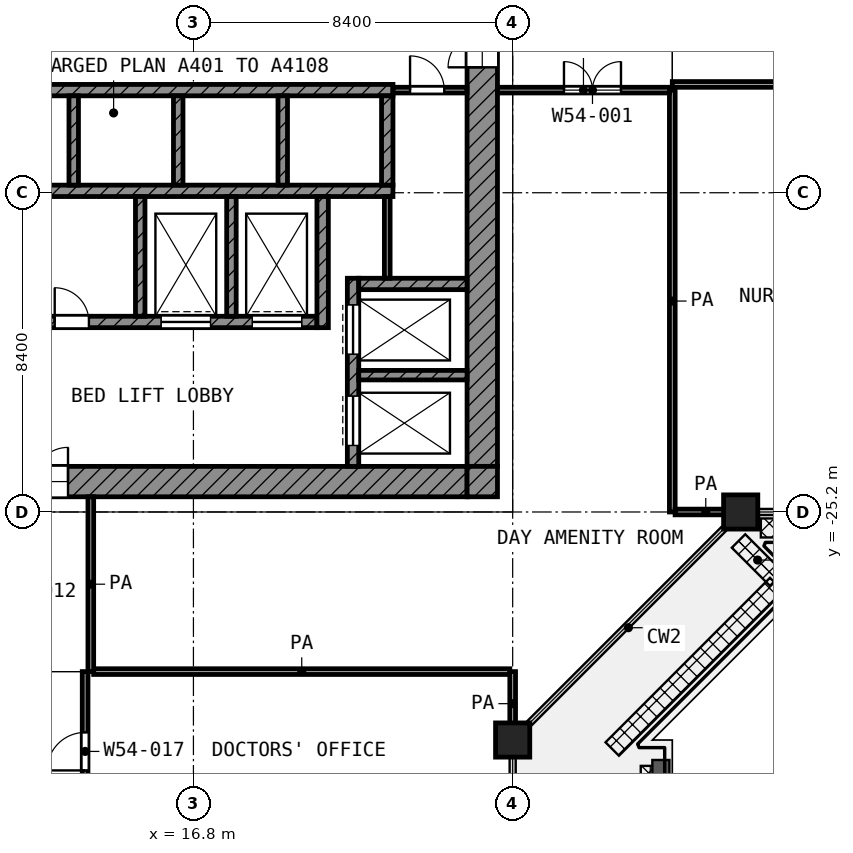
"""IFC4 building model, lengths in metres.
Left out: names, types, materials, properties, quantities, classifications, styles, units other than length and angle.
Written with IfcOpenShell. Run it as: python <this file> out.ifc"""

import sys

from ifc_helpers import new_model, si_unit, direction, frame, frame_2d, origin, origin_2d, place, context, subcontext, project, spatial, rectangle, extrude, element, fill, save


model = new_model("IFC4")
c1 = context("Model", 3, precision=1e-05, world=origin(), true_north=direction((0.0, 1.0)))
c2 = subcontext(c1, "Body", "Model", "MODEL_VIEW")
j1 = project(units=[si_unit("LENGTHUNIT", "METRE"), si_unit("PLANEANGLEUNIT", "RADIAN")], contexts=[c1])
p1 = place(None, origin())
s1 = spatial("IfcSite", under=j1, at=p1, CompositionType="ELEMENT")
p2 = place(p1, origin())
s2 = spatial("IfcBuilding", under=s1, at=p2, CompositionType="ELEMENT")
p3 = place(p2, frame((0.0, 0.0, 255.8)))
s3 = spatial("IfcBuildingStorey", under=s2, at=p3, CompositionType="ELEMENT", Elevation=255.8)
for number, where, z_axis, x_axis in (
    (1, (31.2, -25.2, 0.0), (0.0, 0.0, 1.0), (1.0, 0.0, 0.0)),
    (2, (25.2, -31.2, 0.0), (0.0, 0.0, 1.0), (1.0, 0.0, 0.0)),
):
    element("IfcColumn", number, at=place(p3, frame(where, z_axis=z_axis, x_axis=x_axis)), inside=s3, PredefinedType="COLUMN", context=c2, shape_type="SweptSolid", body=[
        extrude(rectangle(XDim=0.9, YDim=0.9, at=origin_2d()), origin(), (0.0, 0.0, 1.0), 4.2),
    ])
p4 = place(p3, frame((24.4, -24.0, 0.0), z_axis=(0.0, 0.0, 1.0), x_axis=(0.0, 1.0, 0.0)))
e3 = element("IfcWall", 3, at=p4, inside=s3, PredefinedType="SHEAR", context=c2, shape_type="SweptSolid", body=[
    extrude(rectangle(XDim=18.6, YDim=0.8, at=frame_2d((9.3, 0.0))), origin(), (0.0, 0.0, 1.0), 3.6),
])
p5 = place(p4, frame((10.5, 0.0, 0.0)))
e4 = element("IfcOpeningElement", 4, at=p5, cuts=e3, PredefinedType="OPENING", context=c2, shape_type="SweptSolid", body=[
    extrude(rectangle(XDim=1.8, YDim=2.1, at=frame_2d((0.9, 1.05))), frame((0.0, 0.41, 0.0), z_axis=(0.0, -1.0, 0.0), x_axis=(1.0, 0.0, 0.0)), (0.0, 0.0, 1.0), 0.82),
])
p6 = place(p3, frame((5.4, -24.4, 0.0), z_axis=(0.0, 0.0, 1.0), x_axis=(1.0, 0.0, 0.0)))
e5 = element("IfcWall", 5, at=p6, inside=s3, PredefinedType="SHEAR", context=c2, shape_type="SweptSolid", body=[
    extrude(rectangle(XDim=18.6, YDim=0.8, at=frame_2d((9.3, 0.0))), origin(), (0.0, 0.0, 1.0), 3.6),
])
p7 = place(p6, frame((6.3, 0.0, 0.0)))
e6 = element("IfcOpeningElement", 6, at=p7, cuts=e5, PredefinedType="OPENING", context=c2, shape_type="SweptSolid", body=[
    extrude(rectangle(XDim=1.8, YDim=2.1, at=frame_2d((0.9, 1.05))), frame((0.0, 0.41, 0.0), z_axis=(0.0, -1.0, 0.0), x_axis=(1.0, 0.0, 0.0)), (0.0, 0.0, 1.0), 0.82),
])
p8 = place(p3, frame((24.4, -24.8, 0.0), z_axis=(0.0, 0.0, 1.0), x_axis=(0.0, 1.0, 0.0)))
e7 = element("IfcWall", 7, at=p8, inside=s3, PredefinedType="SHEAR", context=c2, shape_type="SweptSolid", body=[
    extrude(rectangle(XDim=0.8, YDim=0.8, at=frame_2d((0.4, 0.0))), origin(), (0.0, 0.0, 1.0), 3.6),
])
p9 = place(p3, frame((5.4, -14.1, 0.0), z_axis=(0.0, 0.0, 1.0), x_axis=(1.0, 0.0, 0.0)))
e8 = element("IfcWall", 8, at=p9, inside=s3, PredefinedType="SHEAR", context=c2, shape_type="SweptSolid", body=[
    extrude(rectangle(XDim=16.65, YDim=0.3, at=frame_2d((8.325, 0.0))), origin(), (0.0, 0.0, 1.0), 3.6),
])
p10 = place(p9, frame((0.825, 0.0, 0.0)))
e9 = element("IfcOpeningElement", 9, at=p10, cuts=e8, PredefinedType="OPENING", context=c2, shape_type="SweptSolid", body=[
    extrude(rectangle(XDim=1.1, YDim=2.1, at=frame_2d((0.55, 1.05))), frame((0.0, 0.16, 0.0), z_axis=(0.0, -1.0, 0.0), x_axis=(1.0, 0.0, 0.0)), (0.0, 0.0, 1.0), 0.32),
])
p11 = place(p9, frame((3.575, 0.0, 0.0)))
e10 = element("IfcOpeningElement", 10, at=p11, cuts=e8, PredefinedType="OPENING", context=c2, shape_type="SweptSolid", body=[
    extrude(rectangle(XDim=1.1, YDim=2.1, at=frame_2d((0.55, 1.05))), frame((0.0, 0.16, 0.0), z_axis=(0.0, -1.0, 0.0), x_axis=(1.0, 0.0, 0.0)), (0.0, 0.0, 1.0), 0.32),
])
p12 = place(p3, frame((5.4, -16.75, 0.0), z_axis=(0.0, 0.0, 1.0), x_axis=(1.0, 0.0, 0.0)))
e11 = element("IfcWall", 11, at=p12, inside=s3, PredefinedType="SHEAR", context=c2, shape_type="SweptSolid", body=[
    extrude(rectangle(XDim=16.65, YDim=0.3, at=frame_2d((8.325, 0.0))), origin(), (0.0, 0.0, 1.0), 3.6),
])
p13 = place(p3, frame((5.4, -20.2, 0.0), z_axis=(0.0, 0.0, 1.0), x_axis=(1.0, 0.0, 0.0)))
e12 = element("IfcWall", 12, at=p13, inside=s3, PredefinedType="SHEAR", context=c2, shape_type="SweptSolid", body=[
    extrude(rectangle(XDim=14.65, YDim=0.3, at=frame_2d((7.325, 0.0))), origin(), (0.0, 0.0, 1.0), 3.6),
])
p14 = place(p13, frame((10.55, 0.0, 0.0)))
e13 = element("IfcOpeningElement", 13, at=p14, cuts=e12, PredefinedType="OPENING", context=c2, shape_type="SweptSolid", body=[
    extrude(rectangle(XDim=1.3, YDim=2.1, at=frame_2d((0.65, 1.05))), frame((0.0, 0.16, 0.0), z_axis=(0.0, -1.0, 0.0), x_axis=(1.0, 0.0, 0.0)), (0.0, 0.0, 1.0), 0.32),
])
p15 = place(p13, frame((12.95, 0.0, 0.0)))
e14 = element("IfcOpeningElement", 14, at=p15, cuts=e12, PredefinedType="OPENING", context=c2, shape_type="SweptSolid", body=[
    extrude(rectangle(XDim=1.3, YDim=2.1, at=frame_2d((0.65, 1.05))), frame((0.0, 0.16, 0.0), z_axis=(0.0, -1.0, 0.0), x_axis=(1.0, 0.0, 0.0)), (0.0, 0.0, 1.0), 0.32),
])
p16 = place(p13, frame((0.55, 0.0, 0.0)))
e15 = element("IfcOpeningElement", 15, at=p16, cuts=e12, PredefinedType="OPENING", context=c2, shape_type="SweptSolid", body=[
    extrude(rectangle(XDim=1.3, YDim=2.1, at=frame_2d((0.65, 1.05))), frame((0.0, 0.16, 0.0), z_axis=(0.0, -1.0, 0.0), x_axis=(1.0, 0.0, 0.0)), (0.0, 0.0, 1.0), 0.32),
])
p17 = place(p13, frame((2.95, 0.0, 0.0)))
e16 = element("IfcOpeningElement", 16, at=p17, cuts=e12, PredefinedType="OPENING", context=c2, shape_type="SweptSolid", body=[
    extrude(rectangle(XDim=1.3, YDim=2.1, at=frame_2d((0.65, 1.05))), frame((0.0, 0.16, 0.0), z_axis=(0.0, -1.0, 0.0), x_axis=(1.0, 0.0, 0.0)), (0.0, 0.0, 1.0), 0.32),
])
p18 = place(p13, frame((5.35, 0.0, 0.0)))
e17 = element("IfcOpeningElement", 17, at=p18, cuts=e12, PredefinedType="OPENING", context=c2, shape_type="SweptSolid", body=[
    extrude(rectangle(XDim=0.9, YDim=2.1, at=frame_2d((0.45, 1.05))), frame((0.0, 0.16, 0.0), z_axis=(0.0, -1.0, 0.0), x_axis=(1.0, 0.0, 0.0)), (0.0, 0.0, 1.0), 0.32),
])
p19 = place(p13, frame((7.75, 0.0, 0.0)))
e18 = element("IfcOpeningElement", 18, at=p19, cuts=e12, PredefinedType="OPENING", context=c2, shape_type="SweptSolid", body=[
    extrude(rectangle(XDim=0.9, YDim=2.1, at=frame_2d((0.45, 1.05))), frame((0.0, 0.16, 0.0), z_axis=(0.0, -1.0, 0.0), x_axis=(1.0, 0.0, 0.0)), (0.0, 0.0, 1.0), 0.32),
])
p20 = place(p3, frame((20.2, -20.35, 0.0), z_axis=(0.0, 0.0, 1.0), x_axis=(0.0, 1.0, 0.0)))
e19 = element("IfcWall", 19, at=p20, inside=s3, PredefinedType="SHEAR", context=c2, shape_type="SweptSolid", body=[
    extrude(rectangle(XDim=3.45, YDim=0.3, at=frame_2d((1.725, 0.0))), origin(), (0.0, 0.0, 1.0), 3.6),
])
p21 = place(p3, frame((21.9, -16.6, 0.0), z_axis=(0.0, 0.0, 1.0), x_axis=(0.0, 1.0, 0.0)))
e20 = element("IfcWall", 20, at=p21, inside=s3, PredefinedType="SHEAR", context=c2, shape_type="SweptSolid", body=[
    extrude(rectangle(XDim=2.35, YDim=0.3, at=frame_2d((1.175, 0.0))), origin(), (0.0, 0.0, 1.0), 3.6),
])
p22 = place(p3, frame((21.15, -19.2, 0.0), z_axis=(0.0, 0.0, 1.0), x_axis=(1.0, 0.0, 0.0)))
e21 = element("IfcWall", 21, at=p22, inside=s3, PredefinedType="SHEAR", context=c2, shape_type="SweptSolid", body=[
    extrude(rectangle(XDim=2.85, YDim=0.3, at=frame_2d((1.425, 0.0))), origin(), (0.0, 0.0, 1.0), 3.6),
])
p23 = place(p3, frame((21.0, -24.0, 0.0), z_axis=(0.0, 0.0, 1.0), x_axis=(0.0, 1.0, 0.0)))
e22 = element("IfcWall", 22, at=p23, inside=s3, PredefinedType="SHEAR", context=c2, shape_type="SweptSolid", body=[
    extrude(rectangle(XDim=4.95, YDim=0.3, at=frame_2d((2.475, 0.0))), origin(), (0.0, 0.0, 1.0), 3.6),
])
p24 = place(p23, frame((2.95, 0.0, 0.0)))
e23 = element("IfcOpeningElement", 23, at=p24, cuts=e22, PredefinedType="OPENING", context=c2, shape_type="SweptSolid", body=[
    extrude(rectangle(XDim=1.3, YDim=2.1, at=frame_2d((0.65, 1.05))), frame((0.0, 0.16, 0.0), z_axis=(0.0, -1.0, 0.0), x_axis=(1.0, 0.0, 0.0)), (0.0, 0.0, 1.0), 0.32),
])
p25 = place(p23, frame((0.55, 0.0, 0.0)))
e24 = element("IfcOpeningElement", 24, at=p25, cuts=e22, PredefinedType="OPENING", context=c2, shape_type="SweptSolid", body=[
    extrude(rectangle(XDim=1.3, YDim=2.1, at=frame_2d((0.65, 1.05))), frame((0.0, 0.16, 0.0), z_axis=(0.0, -1.0, 0.0), x_axis=(1.0, 0.0, 0.0)), (0.0, 0.0, 1.0), 0.32),
])
p26 = place(p3, frame((21.15, -21.6, 0.0), z_axis=(0.0, 0.0, 1.0), x_axis=(1.0, 0.0, 0.0)))
e25 = element("IfcWall", 25, at=p26, inside=s3, PredefinedType="SHEAR", context=c2, shape_type="SweptSolid", body=[
    extrude(rectangle(XDim=2.85, YDim=0.25, at=frame_2d((1.425, 0.0))), origin(), (0.0, 0.0, 1.0), 3.6),
])
for number, where, z_axis, x_axis in (
    (26, (15.4, -20.05, 0.0), (0.0, 0.0, 1.0), (0.0, 1.0, 0.0)),
    (27, (17.8, -20.05, 0.0), (0.0, 0.0, 1.0), (0.0, 1.0, 0.0)),
):
    element("IfcWall", number, at=place(p3, frame(where, z_axis=z_axis, x_axis=x_axis)), inside=s3, PredefinedType="SHEAR", context=c2, shape_type="SweptSolid", body=[
        extrude(rectangle(XDim=3.15, YDim=0.25, at=frame_2d((1.575, 0.0))), origin(), (0.0, 0.0, 1.0), 3.6),
    ])
for number, where, z_axis, x_axis in (
    (28, (13.65, -16.6, 0.0), (0.0, 0.0, 1.0), (0.0, 1.0, 0.0)),
    (29, (16.4, -16.6, 0.0), (0.0, 0.0, 1.0), (0.0, 1.0, 0.0)),
    (30, (19.15, -16.6, 0.0), (0.0, 0.0, 1.0), (0.0, 1.0, 0.0)),
):
    element("IfcWall", number, at=place(p3, frame(where, z_axis=z_axis, x_axis=x_axis)), inside=s3, PredefinedType="SHEAR", context=c2, shape_type="SweptSolid", body=[
        extrude(rectangle(XDim=2.35, YDim=0.25, at=frame_2d((1.175, 0.0))), origin(), (0.0, 0.0, 1.0), 3.6),
    ])
p27 = place(p3, frame((21.9, -19.05, 0.0), z_axis=(0.0, 0.0, 1.0), x_axis=(0.0, 1.0, 0.0)))
e31 = element("IfcWall", 31, at=p27, inside=s3, PredefinedType="PARTITIONING", context=c2, shape_type="SweptSolid", body=[
    extrude(rectangle(XDim=2.15, YDim=0.15, at=frame_2d((1.075, 0.0))), origin(), (0.0, 0.0, 1.0), 3.6),
])
p28 = place(p3, frame((22.05, -14.1, 0.0), z_axis=(0.0, 0.0, 1.0), x_axis=(1.0, 0.0, 0.0)))
e32 = element("IfcWall", 32, at=p28, inside=s3, PredefinedType="PARTITIONING", context=c2, shape_type="SweptSolid", body=[
    extrude(rectangle(XDim=1.95, YDim=0.15, at=frame_2d((0.975, 0.0))), origin(), (0.0, 0.0, 1.0), 3.6),
])
p29 = place(p28, frame((0.45, 0.0, 0.0)))
e33 = element("IfcOpeningElement", 33, at=p29, cuts=e32, PredefinedType="OPENING", context=c2, shape_type="SweptSolid", body=[
    extrude(rectangle(XDim=0.9, YDim=2.1, at=frame_2d((0.45, 1.05))), frame((0.0, 0.085, 0.0), z_axis=(0.0, -1.0, 0.0), x_axis=(1.0, 0.0, 0.0)), (0.0, 0.0, 1.0), 0.17),
])
p30 = place(p3, frame((14.175, -29.4, 0.0), z_axis=(0.0, 0.0, 1.0), x_axis=(1.0, 0.0, 0.0)))
e34 = element("IfcWall", 34, at=p30, inside=s3, PredefinedType="PARTITIONING", context=c2, shape_type="SweptSolid", body=[
    extrude(rectangle(XDim=10.95, YDim=0.15, at=frame_2d((5.475, 0.0))), origin(), (0.0, 0.0, 1.0), 3.6),
])
p31 = place(p3, frame((29.475, -25.2, 0.0), z_axis=(0.0, 0.0, 1.0), x_axis=(1.0, 0.0, 0.0)))
e35 = element("IfcWall", 35, at=p31, inside=s3, PredefinedType="PARTITIONING", context=c2, shape_type="SweptSolid", body=[
    extrude(rectangle(XDim=1.612, YDim=0.15, at=frame_2d((0.806, 0.0))), origin(), (0.0, 0.0, 1.0), 3.6),
])
p32 = place(p3, frame((24.8, -14.1, 0.0), z_axis=(0.0, 0.0, 1.0), x_axis=(1.0, 0.0, 0.0)))
e36 = element("IfcWall", 36, at=p32, inside=s3, PredefinedType="PARTITIONING", context=c2, shape_type="SweptSolid", body=[
    extrude(rectangle(XDim=4.525, YDim=0.15, at=frame_2d((2.262, 0.0))), origin(), (0.0, 0.0, 1.0), 3.6),
])
p33 = place(p32, frame((1.75, 0.0, 0.0)))
e37 = element("IfcOpeningElement", 37, at=p33, cuts=e36, PredefinedType="OPENING", context=c2, shape_type="SweptSolid", body=[
    extrude(rectangle(XDim=1.5, YDim=2.1, at=frame_2d((0.75, 1.05))), frame((0.0, 0.085, 0.0), z_axis=(0.0, -1.0, 0.0), x_axis=(1.0, 0.0, 0.0)), (0.0, 0.0, 1.0), 0.17),
])
p34 = place(p3, frame((29.4, -13.95, 0.0), z_axis=(0.0, 0.0, 1.0), x_axis=(1.0, 0.0, 0.0)))
e38 = element("IfcWall", 38, at=p34, inside=s3, PredefinedType="PARTITIONING", context=c2, shape_type="SweptSolid", body=[
    extrude(rectangle(XDim=33.52, YDim=0.15, at=frame_2d((16.76, 0.0))), origin(), (0.0, 0.0, 1.0), 2.7),
])
p35 = place(p34, frame((3.45, 0.0, 0.0)))
e39 = element("IfcOpeningElement", 39, at=p35, cuts=e38, PredefinedType="OPENING", context=c2, shape_type="SweptSolid", body=[
    extrude(rectangle(XDim=1.2, YDim=2.1, at=frame_2d((0.6, 1.05))), frame((0.0, 0.085, 0.0), z_axis=(0.0, -1.0, 0.0), x_axis=(1.0, 0.0, 0.0)), (0.0, 0.0, 1.0), 0.17),
])
p36 = place(p34, frame((11.2, 0.0, 0.0)))
e40 = element("IfcOpeningElement", 40, at=p36, cuts=e38, PredefinedType="OPENING", context=c2, shape_type="SweptSolid", body=[
    extrude(rectangle(XDim=1.2, YDim=2.1, at=frame_2d((0.6, 1.05))), frame((0.0, 0.085, 0.0), z_axis=(0.0, -1.0, 0.0), x_axis=(1.0, 0.0, 0.0)), (0.0, 0.0, 1.0), 0.17),
])
p37 = place(p34, frame((13.6, 0.0, 0.0)))
e41 = element("IfcOpeningElement", 41, at=p37, cuts=e38, PredefinedType="OPENING", context=c2, shape_type="SweptSolid", body=[
    extrude(rectangle(XDim=1.2, YDim=2.1, at=frame_2d((0.6, 1.05))), frame((0.0, 0.085, 0.0), z_axis=(0.0, -1.0, 0.0), x_axis=(1.0, 0.0, 0.0)), (0.0, 0.0, 1.0), 0.17),
])
p38 = place(p34, frame((21.075, 0.0, 0.0)))
e42 = element("IfcOpeningElement", 42, at=p38, cuts=e38, PredefinedType="OPENING", context=c2, shape_type="SweptSolid", body=[
    extrude(rectangle(XDim=1.2, YDim=2.1, at=frame_2d((0.6, 1.05))), frame((0.0, 0.085, 0.0), z_axis=(0.0, -1.0, 0.0), x_axis=(1.0, 0.0, 0.0)), (0.0, 0.0, 1.0), 0.17),
])
p39 = place(p34, frame((19.55, 0.0, 0.0)))
e43 = element("IfcOpeningElement", 43, at=p39, cuts=e38, PredefinedType="OPENING", context=c2, shape_type="SweptSolid", body=[
    extrude(rectangle(XDim=1.2, YDim=2.1, at=frame_2d((0.6, 1.05))), frame((0.0, 0.085, 0.0), z_axis=(0.0, -1.0, 0.0), x_axis=(1.0, 0.0, 0.0)), (0.0, 0.0, 1.0), 0.17),
])
p40 = place(p34, frame((22.95, 0.0, 0.0)))
e44 = element("IfcOpeningElement", 44, at=p40, cuts=e38, PredefinedType="OPENING", context=c2, shape_type="SweptSolid", body=[
    extrude(rectangle(XDim=1.2, YDim=2.1, at=frame_2d((0.6, 1.05))), frame((0.0, 0.085, 0.0), z_axis=(0.0, -1.0, 0.0), x_axis=(1.0, 0.0, 0.0)), (0.0, 0.0, 1.0), 0.17),
])
p41 = place(p34, frame((28.35, 0.0, 0.0)))
e45 = element("IfcOpeningElement", 45, at=p41, cuts=e38, PredefinedType="OPENING", context=c2, shape_type="SweptSolid", body=[
    extrude(rectangle(XDim=1.5, YDim=2.1, at=frame_2d((0.75, 1.05))), frame((0.0, 0.085, 0.0), z_axis=(0.0, -1.0, 0.0), x_axis=(1.0, 0.0, 0.0)), (0.0, 0.0, 1.0), 0.17),
])
p42 = place(p3, frame((13.95, -46.12, 0.0), z_axis=(0.0, 0.0, 1.0), x_axis=(0.0, 1.0, 0.0)))
e46 = element("IfcWall", 46, at=p42, inside=s3, PredefinedType="PARTITIONING", context=c2, shape_type="SweptSolid", body=[
    extrude(rectangle(XDim=16.72, YDim=0.15, at=frame_2d((8.36, 0.0))), origin(), (0.0, 0.0, 1.0), 3.6),
])
p43 = place(p42, frame((14.12, 0.0, 0.0)))
e47 = element("IfcOpeningElement", 47, at=p43, cuts=e46, PredefinedType="OPENING", context=c2, shape_type="SweptSolid", body=[
    extrude(rectangle(XDim=1.0, YDim=2.1, at=frame_2d((0.5, 1.05))), frame((0.0, 0.085, 0.0), z_axis=(0.0, -1.0, 0.0), x_axis=(1.0, 0.0, 0.0)), (0.0, 0.0, 1.0), 0.17),
])
p44 = place(p42, frame((9.82, 0.0, 0.0)))
e48 = element("IfcOpeningElement", 48, at=p44, cuts=e46, PredefinedType="OPENING", context=c2, shape_type="SweptSolid", body=[
    extrude(rectangle(XDim=1.2, YDim=2.1, at=frame_2d((0.6, 1.05))), frame((0.0, 0.085, 0.0), z_axis=(0.0, -1.0, 0.0), x_axis=(1.0, 0.0, 0.0)), (0.0, 0.0, 1.0), 0.17),
])
p45 = place(p42, frame((5.72, 0.0, 0.0)))
e49 = element("IfcOpeningElement", 49, at=p45, cuts=e46, PredefinedType="OPENING", context=c2, shape_type="SweptSolid", body=[
    extrude(rectangle(XDim=1.0, YDim=2.1, at=frame_2d((0.5, 1.05))), frame((0.0, 0.085, 0.0), z_axis=(0.0, -1.0, 0.0), x_axis=(1.0, 0.0, 0.0)), (0.0, 0.0, 1.0), 0.17),
])
p46 = place(p42, frame((1.52, 0.0, 0.0)))
e50 = element("IfcOpeningElement", 50, at=p46, cuts=e46, PredefinedType="OPENING", context=c2, shape_type="SweptSolid", body=[
    extrude(rectangle(XDim=1.0, YDim=2.1, at=frame_2d((0.5, 1.05))), frame((0.0, 0.085, 0.0), z_axis=(0.0, -1.0, 0.0), x_axis=(1.0, 0.0, 0.0)), (0.0, 0.0, 1.0), 0.17),
])
p47 = place(p3, frame((14.1, -29.4, 0.0), z_axis=(0.0, 0.0, 1.0), x_axis=(0.0, 1.0, 0.0)))
e51 = element("IfcWall", 51, at=p47, inside=s3, PredefinedType="PARTITIONING", context=c2, shape_type="SweptSolid", body=[
    extrude(rectangle(XDim=4.6, YDim=0.15, at=frame_2d((2.3, 0.0))), origin(), (0.0, 0.0, 1.0), 3.6),
])
p48 = place(p3, frame((25.2, -31.087, 0.0), z_axis=(0.0, 0.0, 1.0), x_axis=(0.0, 1.0, 0.0)))
e52 = element("IfcWall", 52, at=p48, inside=s3, PredefinedType="PARTITIONING", context=c2, shape_type="SweptSolid", body=[
    extrude(rectangle(XDim=1.687, YDim=0.15, at=frame_2d((0.844, 0.0))), origin(), (0.0, 0.0, 1.0), 3.6),
])
p49 = place(p3, frame((29.4, -25.2, 0.0), z_axis=(0.0, 0.0, 1.0), x_axis=(0.0, 1.0, 0.0)))
e53 = element("IfcWall", 53, at=p49, inside=s3, PredefinedType="PARTITIONING", context=c2, shape_type="SweptSolid", body=[
    extrude(rectangle(XDim=11.1, YDim=0.15, at=frame_2d((5.55, 0.0))), origin(), (0.0, 0.0, 1.0), 3.6),
])
p50 = place(p24, origin())
e54 = element("IfcDoor", 54, at=p50, inside=s3, OperationType="DOUBLE_DOOR_SLIDING", PredefinedType="DOOR", context=c2, shape_type="SweptSolid", body=[
    extrude(rectangle(XDim=1.3, YDim=2.1, at=frame_2d((0.65, 1.05))), frame((0.0, 0.025, 0.0), z_axis=(0.0, -1.0, 0.0), x_axis=(1.0, 0.0, 0.0)), (0.0, 0.0, 1.0), 0.05),
])
fill(e23, e54)
p51 = place(p25, origin())
e55 = element("IfcDoor", 55, at=p51, inside=s3, OperationType="DOUBLE_DOOR_SLIDING", PredefinedType="DOOR", context=c2, shape_type="SweptSolid", body=[
    extrude(rectangle(XDim=1.3, YDim=2.1, at=frame_2d((0.65, 1.05))), frame((0.0, 0.025, 0.0), z_axis=(0.0, -1.0, 0.0), x_axis=(1.0, 0.0, 0.0)), (0.0, 0.0, 1.0), 0.05),
])
fill(e24, e55)
p52 = place(p14, origin())
e56 = element("IfcDoor", 56, at=p52, inside=s3, OperationType="DOUBLE_DOOR_SLIDING", PredefinedType="DOOR", context=c2, shape_type="SweptSolid", body=[
    extrude(rectangle(XDim=1.3, YDim=2.1, at=frame_2d((0.65, 1.05))), frame((0.0, 0.025, 0.0), z_axis=(0.0, -1.0, 0.0), x_axis=(1.0, 0.0, 0.0)), (0.0, 0.0, 1.0), 0.05),
])
fill(e13, e56)
p53 = place(p15, origin())
e57 = element("IfcDoor", 57, at=p53, inside=s3, OperationType="DOUBLE_DOOR_SLIDING", PredefinedType="DOOR", context=c2, shape_type="SweptSolid", body=[
    extrude(rectangle(XDim=1.3, YDim=2.1, at=frame_2d((0.65, 1.05))), frame((0.0, 0.025, 0.0), z_axis=(0.0, -1.0, 0.0), x_axis=(1.0, 0.0, 0.0)), (0.0, 0.0, 1.0), 0.05),
])
fill(e14, e57)
p54 = place(p5, origin())
e58 = element("IfcDoor", 58, at=p54, inside=s3, OperationType="DOUBLE_DOOR_SINGLE_SWING", PredefinedType="DOOR", context=c2, shape_type="SweptSolid", body=[
    extrude(rectangle(XDim=1.8, YDim=2.1, at=frame_2d((0.9, 1.05))), frame((0.0, 0.025, 0.0), z_axis=(0.0, -1.0, 0.0), x_axis=(1.0, 0.0, 0.0)), (0.0, 0.0, 1.0), 0.05),
])
fill(e4, e58)
p55 = place(p7, origin())
e59 = element("IfcDoor", 59, at=p55, inside=s3, OperationType="DOUBLE_DOOR_SINGLE_SWING", PredefinedType="DOOR", context=c2, shape_type="SweptSolid", body=[
    extrude(rectangle(XDim=1.8, YDim=2.1, at=frame_2d((0.9, 1.05))), frame((0.0, 0.025, 0.0), z_axis=(0.0, -1.0, 0.0), x_axis=(1.0, 0.0, 0.0)), (0.0, 0.0, 1.0), 0.05),
])
fill(e6, e59)
p56 = place(p29, origin())
e60 = element("IfcDoor", 60, at=p56, inside=s3, OperationType="SINGLE_SWING_LEFT", PredefinedType="DOOR", context=c2, shape_type="SweptSolid", body=[
    extrude(rectangle(XDim=0.9, YDim=2.1, at=frame_2d((0.45, 1.05))), frame((0.0, 0.025, 0.0), z_axis=(0.0, -1.0, 0.0), x_axis=(1.0, 0.0, 0.0)), (0.0, 0.0, 1.0), 0.05),
])
fill(e33, e60)
p57 = place(p19, origin())
e61 = element("IfcDoor", 61, at=p57, inside=s3, OperationType="SINGLE_SWING_LEFT", PredefinedType="DOOR", context=c2, shape_type="SweptSolid", body=[
    extrude(rectangle(XDim=0.9, YDim=2.1, at=frame_2d((0.45, 1.05))), frame((0.0, 0.025, 0.0), z_axis=(0.0, -1.0, 0.0), x_axis=(1.0, 0.0, 0.0)), (0.0, 0.0, 1.0), 0.05),
])
fill(e18, e61)
p58 = place(p33, origin())
e62 = element("IfcDoor", 62, at=p58, inside=s3, OperationType="DOUBLE_DOOR_SINGLE_SWING", PredefinedType="DOOR", context=c2, shape_type="SweptSolid", body=[
    extrude(rectangle(XDim=1.5, YDim=2.1, at=frame_2d((0.75, 1.05))), frame((0.0, 0.025, 0.0), z_axis=(0.0, -1.0, 0.0), x_axis=(1.0, 0.0, 0.0)), (0.0, 0.0, 1.0), 0.05),
])
fill(e37, e62)
p59 = place(p43, origin())
e63 = element("IfcDoor", 63, at=p59, inside=s3, OperationType="SINGLE_SWING_LEFT", PredefinedType="DOOR", context=c2, shape_type="SweptSolid", body=[
    extrude(rectangle(XDim=1.0, YDim=2.1, at=frame_2d((0.5, 1.05))), frame((0.0, 0.025, 0.0), z_axis=(0.0, -1.0, 0.0), x_axis=(1.0, 0.0, 0.0)), (0.0, 0.0, 1.0), 0.05),
])
fill(e47, e63)
save(model, sys.argv[1])
